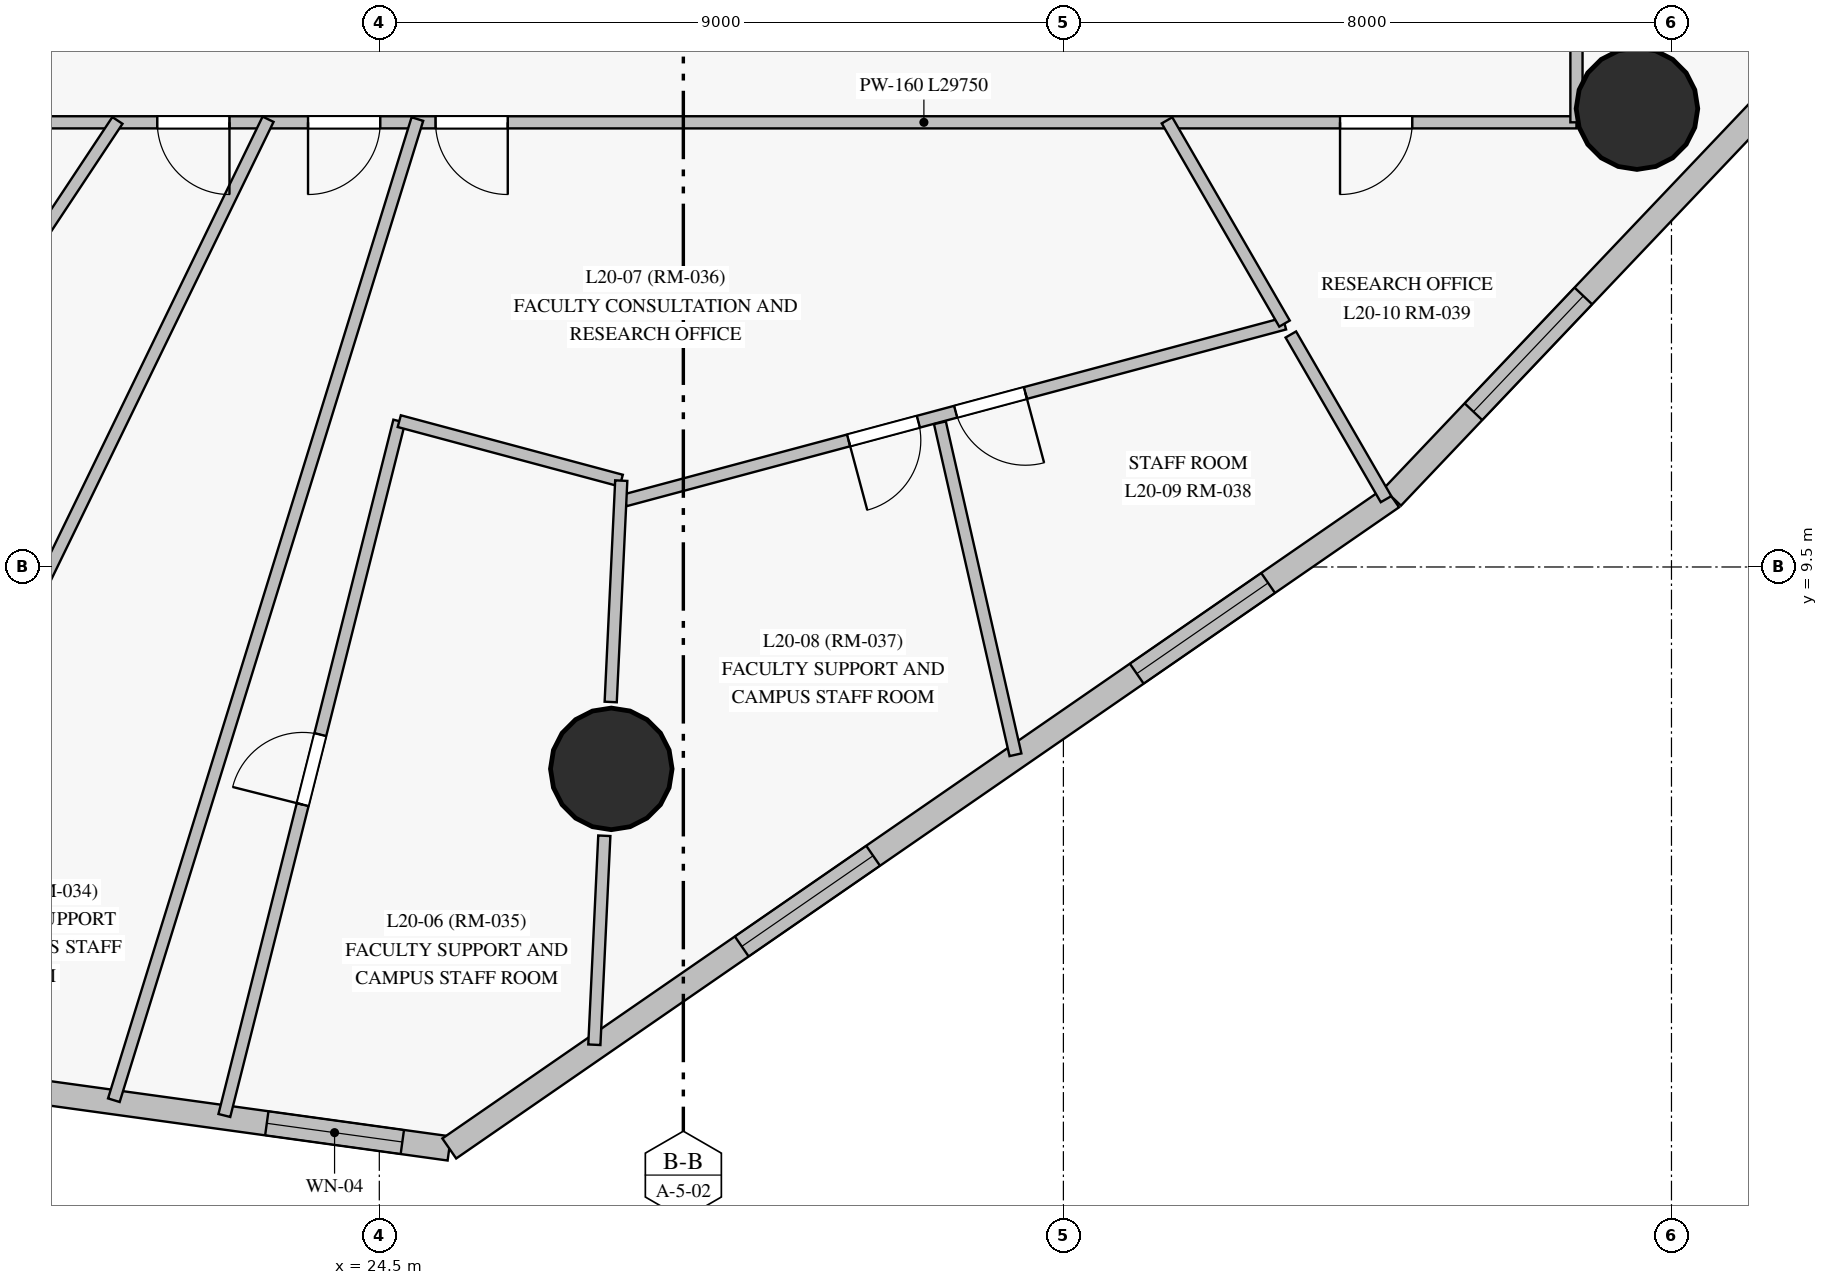
"""IFC4 building model, lengths in metres.
Left out: names, types, materials, properties, quantities, classifications, styles, units other than length and angle.
Written with IfcOpenShell. Run it as: python <this file> out.ifc"""

import sys

from ifc_helpers import new_model, si_unit, direction, frame, frame_2d, origin, origin_with_axes, origin_2d, place, context, subcontext, project, spatial, rectangle, circle, extrude, source, transform, mapped, element, fill, save


model = new_model("IFC4")
c1 = context("Model", 3, precision=1e-05, world=origin(), true_north=direction((0.0, 1.0)))
c2 = subcontext(c1, "Body", "Model", "MODEL_VIEW")
j1 = project(units=[si_unit("LENGTHUNIT", "METRE"), si_unit("PLANEANGLEUNIT", "RADIAN")], contexts=[c1])
p1 = place(None, origin())
s1 = spatial("IfcSite", under=j1, at=p1, CompositionType="ELEMENT")
p2 = place(p1, origin())
s2 = spatial("IfcBuilding", under=s1, at=p2, CompositionType="ELEMENT")
p3 = place(p2, frame((0.0, 0.0, 76.9)))
s3 = spatial("IfcBuildingStorey", under=s2, at=p3, CompositionType="ELEMENT", Elevation=76.9)
m1 = source(origin_with_axes(), c2, "Body", "SweptSolid", [
    extrude(circle(Radius=0.8, at=origin_2d()), origin(), (0.0, 0.0, 1.0), 3.6),
])
for number, where, z_axis, x_axis in (
    (1, (27.552, 6.844, 0.0), (0.0, 0.0, 1.0), (1.0, 0.0, 0.0)),
    (2, (41.046, 15.53, 0.0), (0.0, 0.0, 1.0), (1.0, 0.0, 0.0)),
):
    element("IfcColumn", number, at=place(p3, frame(where, z_axis=z_axis, x_axis=x_axis)), inside=s3, PredefinedType="COLUMN", context=c2, shape_type="MappedRepresentation", body=[
        mapped(m1, transform((0.0, 0.0, 0.0), scale=1.0)),
    ])
p4 = place(p3, frame((15.447, 3.226, 0.0), z_axis=(0.0, 0.0, 1.0), x_axis=(0.990613318008, -0.136694016636, 0.0)))
e3 = element("IfcWall", 3, at=p4, inside=s3, PredefinedType="SOLIDWALL", context=c2, shape_type="SweptSolid", body=[
    extrude(rectangle(XDim=10.068, YDim=0.32, at=frame_2d((5.034, 0.0))), origin(), (0.0, 0.0, 1.0), 3.35),
])
p5 = place(p4, frame((2.563, 0.0, 0.85)))
e4 = element("IfcOpeningElement", 4, at=p5, cuts=e3, PredefinedType="OPENING", context=c2, shape_type="SweptSolid", body=[
    extrude(rectangle(XDim=2.1, YDim=1.95, at=frame_2d((1.05, 0.975))), frame((0.0, 0.17, 0.0), z_axis=(0.0, -1.0, 0.0), x_axis=(1.0, 0.0, 0.0)), (0.0, 0.0, 1.0), 0.34),
])
p6 = place(p4, frame((7.645, 0.0, 0.85)))
e5 = element("IfcOpeningElement", 5, at=p6, cuts=e3, PredefinedType="OPENING", context=c2, shape_type="SweptSolid", body=[
    extrude(rectangle(XDim=1.8, YDim=1.85, at=frame_2d((0.9, 0.925))), frame((0.0, 0.17, 0.0), z_axis=(0.0, -1.0, 0.0), x_axis=(1.0, 0.0, 0.0)), (0.0, 0.0, 1.0), 0.34),
])
p7 = place(p3, frame((25.42, 1.85, 0.0), z_axis=(0.0, 0.0, 1.0), x_axis=(0.822842271762, 0.568269826581, 0.0)))
e6 = element("IfcWall", 6, at=p7, inside=s3, PredefinedType="SOLIDWALL", context=c2, shape_type="SweptSolid", body=[
    extrude(rectangle(XDim=15.076, YDim=0.32, at=frame_2d((7.538, 0.0))), origin(), (0.0, 0.0, 1.0), 3.35),
])
p8 = place(p7, frame((4.677, 0.0, 0.85)))
e7 = element("IfcOpeningElement", 7, at=p8, cuts=e6, PredefinedType="OPENING", context=c2, shape_type="SweptSolid", body=[
    extrude(rectangle(XDim=2.1, YDim=1.95, at=frame_2d((1.05, 0.975))), frame((0.0, 0.17, 0.0), z_axis=(0.0, -1.0, 0.0), x_axis=(1.0, 0.0, 0.0)), (0.0, 0.0, 1.0), 0.34),
])
p9 = place(p7, frame((10.992, 0.0, 0.85)))
e8 = element("IfcOpeningElement", 8, at=p9, cuts=e6, PredefinedType="OPENING", context=c2, shape_type="SweptSolid", body=[
    extrude(rectangle(XDim=2.1, YDim=1.95, at=frame_2d((1.05, 0.975))), frame((0.0, 0.17, 0.0), z_axis=(0.0, -1.0, 0.0), x_axis=(1.0, 0.0, 0.0)), (0.0, 0.0, 1.0), 0.34),
])
p10 = place(p3, frame((37.825, 10.417, 0.0), z_axis=(0.0, 0.0, 1.0), x_axis=(0.688609262867, 0.725132596905, 0.0)))
e9 = element("IfcWall", 9, at=p10, inside=s3, PredefinedType="SOLIDWALL", context=c2, shape_type="SweptSolid", body=[
    extrude(rectangle(XDim=10.481, YDim=0.32, at=frame_2d((5.241, 0.0))), origin(), (0.0, 0.0, 1.0), 3.35),
])
p11 = place(p10, frame((1.552, 0.0, 0.85)))
e10 = element("IfcOpeningElement", 10, at=p11, cuts=e9, PredefinedType="OPENING", context=c2, shape_type="SweptSolid", body=[
    extrude(rectangle(XDim=2.1, YDim=1.95, at=frame_2d((1.05, 0.975))), frame((0.0, 0.17, 0.0), z_axis=(0.0, -1.0, 0.0), x_axis=(1.0, 0.0, 0.0)), (0.0, 0.0, 1.0), 0.34),
])
p12 = place(p10, frame((7.513, 0.0, 0.85)))
e11 = element("IfcOpeningElement", 11, at=p12, cuts=e9, PredefinedType="OPENING", context=c2, shape_type="SweptSolid", body=[
    extrude(rectangle(XDim=2.1, YDim=1.95, at=frame_2d((1.05, 0.975))), frame((0.0, 0.17, 0.0), z_axis=(0.0, -1.0, 0.0), x_axis=(1.0, 0.0, 0.0)), (0.0, 0.0, 1.0), 0.34),
])
p13 = place(p3, frame((40.25, 15.35, 0.0), z_axis=(0.0, 0.0, 1.0), x_axis=(-1.0, 0.0, 0.0)))
e12 = element("IfcWall", 12, at=p13, inside=s3, PredefinedType="PARTITIONING", context=c2, shape_type="SweptSolid", body=[
    extrude(rectangle(XDim=29.75, YDim=0.16, at=frame_2d((14.875, 0.0))), origin(), (0.0, 0.0, 1.0), 2.7),
])
p14 = place(p13, frame((26.037, 0.0, 0.0)))
e13 = element("IfcOpeningElement", 13, at=p14, cuts=e12, PredefinedType="OPENING", context=c2, shape_type="SweptSolid", body=[
    extrude(rectangle(XDim=0.96, YDim=2.15, at=frame_2d((0.48, 1.075))), frame((0.0, 0.09, 0.0), z_axis=(0.0, -1.0, 0.0), x_axis=(1.0, 0.0, 0.0)), (0.0, 0.0, 1.0), 0.18),
])
p15 = place(p13, frame((21.837, 0.0, 0.0)))
e14 = element("IfcOpeningElement", 14, at=p15, cuts=e12, PredefinedType="OPENING", context=c2, shape_type="SweptSolid", body=[
    extrude(rectangle(XDim=0.95, YDim=2.15, at=frame_2d((0.475, 1.075))), frame((0.0, 0.09, 0.0), z_axis=(0.0, -1.0, 0.0), x_axis=(1.0, 0.0, 0.0)), (0.0, 0.0, 1.0), 0.18),
])
p16 = place(p13, frame((17.721, 0.0, 0.0)))
e15 = element("IfcOpeningElement", 15, at=p16, cuts=e12, PredefinedType="OPENING", context=c2, shape_type="SweptSolid", body=[
    extrude(rectangle(XDim=0.95, YDim=2.15, at=frame_2d((0.475, 1.075))), frame((0.0, 0.09, 0.0), z_axis=(0.0, -1.0, 0.0), x_axis=(1.0, 0.0, 0.0)), (0.0, 0.0, 1.0), 0.18),
])
p17 = place(p13, frame((15.738, 0.0, 0.0)))
e16 = element("IfcOpeningElement", 16, at=p17, cuts=e12, PredefinedType="OPENING", context=c2, shape_type="SweptSolid", body=[
    extrude(rectangle(XDim=0.95, YDim=2.15, at=frame_2d((0.475, 1.075))), frame((0.0, 0.09, 0.0), z_axis=(0.0, -1.0, 0.0), x_axis=(1.0, 0.0, 0.0)), (0.0, 0.0, 1.0), 0.18),
])
p18 = place(p13, frame((14.06, 0.0, 0.0)))
e17 = element("IfcOpeningElement", 17, at=p18, cuts=e12, PredefinedType="OPENING", context=c2, shape_type="SweptSolid", body=[
    extrude(rectangle(XDim=0.95, YDim=2.15, at=frame_2d((0.475, 1.075))), frame((0.0, 0.09, 0.0), z_axis=(0.0, -1.0, 0.0), x_axis=(1.0, 0.0, 0.0)), (0.0, 0.0, 1.0), 0.18),
])
p19 = place(p13, frame((2.16, 0.0, 0.0)))
e18 = element("IfcOpeningElement", 18, at=p19, cuts=e12, PredefinedType="OPENING", context=c2, shape_type="SweptSolid", body=[
    extrude(rectangle(XDim=0.95, YDim=2.15, at=frame_2d((0.475, 1.075))), frame((0.0, 0.09, 0.0), z_axis=(0.0, -1.0, 0.0), x_axis=(1.0, 0.0, 0.0)), (0.0, 0.0, 1.0), 0.18),
])
p20 = place(p3, frame((40.25, 37.65, 0.0), z_axis=(0.0, 0.0, 1.0), x_axis=(0.0, -1.0, 0.0)))
e19 = element("IfcWall", 19, at=p20, inside=s3, PredefinedType="PARTITIONING", context=c2, shape_type="SweptSolid", body=[
    extrude(rectangle(XDim=22.3, YDim=0.16, at=frame_2d((11.15, 0.0))), origin(), (0.0, 0.0, 1.0), 2.75),
])
p21 = place(p20, frame((14.02, 0.0, 0.0)))
e20 = element("IfcOpeningElement", 20, at=p21, cuts=e19, PredefinedType="OPENING", context=c2, shape_type="SweptSolid", body=[
    extrude(rectangle(XDim=0.95, YDim=2.15, at=frame_2d((0.475, 1.075))), frame((0.0, 0.09, 0.0), z_axis=(0.0, -1.0, 0.0), x_axis=(1.0, 0.0, 0.0)), (0.0, 0.0, 1.0), 0.18),
])
p22 = place(p20, frame((10.675, 0.0, 0.0)))
e21 = element("IfcOpeningElement", 21, at=p22, cuts=e19, PredefinedType="OPENING", context=c2, shape_type="SweptSolid", body=[
    extrude(rectangle(XDim=0.95, YDim=2.15, at=frame_2d((0.475, 1.075))), frame((0.0, 0.09, 0.0), z_axis=(0.0, -1.0, 0.0), x_axis=(1.0, 0.0, 0.0)), (0.0, 0.0, 1.0), 0.18),
])
p23 = place(p20, frame((8.167, 0.0, 0.0)))
e22 = element("IfcOpeningElement", 22, at=p23, cuts=e19, PredefinedType="OPENING", context=c2, shape_type="SweptSolid", body=[
    extrude(rectangle(XDim=0.86, YDim=2.1, at=frame_2d((0.43, 1.05))), frame((0.0, 0.09, 0.0), z_axis=(0.0, -1.0, 0.0), x_axis=(1.0, 0.0, 0.0)), (0.0, 0.0, 1.0), 0.18),
])
p24 = place(p20, frame((5.49, 0.0, 0.0)))
e23 = element("IfcOpeningElement", 23, at=p24, cuts=e19, PredefinedType="OPENING", context=c2, shape_type="SweptSolid", body=[
    extrude(rectangle(XDim=0.95, YDim=2.15, at=frame_2d((0.475, 1.075))), frame((0.0, 0.09, 0.0), z_axis=(0.0, -1.0, 0.0), x_axis=(1.0, 0.0, 0.0)), (0.0, 0.0, 1.0), 0.18),
])
p25 = place(p20, frame((2.932, 0.0, 0.0)))
e24 = element("IfcOpeningElement", 24, at=p25, cuts=e19, PredefinedType="OPENING", context=c2, shape_type="SweptSolid", body=[
    extrude(rectangle(XDim=0.95, YDim=2.15, at=frame_2d((0.475, 1.075))), frame((0.0, 0.09, 0.0), z_axis=(0.0, -1.0, 0.0), x_axis=(1.0, 0.0, 0.0)), (0.0, 0.0, 1.0), 0.18),
])
p26 = place(p20, frame((6.622, 0.0, 0.0)))
e25 = element("IfcOpeningElement", 25, at=p26, cuts=e19, PredefinedType="OPENING", context=c2, shape_type="SweptSolid", body=[
    extrude(rectangle(XDim=0.95, YDim=2.15, at=frame_2d((0.475, 1.075))), frame((0.0, 0.09, 0.0), z_axis=(0.0, -1.0, 0.0), x_axis=(1.0, 0.0, 0.0)), (0.0, 0.0, 1.0), 0.18),
])
p27 = place(p3, frame((23.037, 15.39, 0.0), z_axis=(0.0, 0.0, 1.0), x_axis=(-0.436938889673, -0.899491193226, 0.0)))
e26 = element("IfcWall", 26, at=p27, inside=s3, PredefinedType="PARTITIONING", context=c2, shape_type="SweptSolid", body=[
    extrude(rectangle(XDim=13.735, YDim=0.16, at=frame_2d((6.868, 0.0))), origin(), (0.0, 0.0, 1.0), 3.35),
])
p28 = place(p3, frame((25.001, 15.393, 0.0), z_axis=(0.0, 0.0, 1.0), x_axis=(-0.29553806887, -0.955330963514, 0.0)))
e27 = element("IfcWall", 27, at=p28, inside=s3, PredefinedType="PARTITIONING", context=c2, shape_type="SweptSolid", body=[
    extrude(rectangle(XDim=13.511, YDim=0.16, at=frame_2d((6.756, 0.0))), origin(), (0.0, 0.0, 1.0), 3.35),
])
p29 = place(p3, frame((22.461, 2.284, 0.0), z_axis=(0.0, 0.0, 1.0), x_axis=(0.244291469889, 0.969701849921, 0.0)))
e28 = element("IfcWall", 28, at=p29, inside=s3, PredefinedType="PARTITIONING", context=c2, shape_type="SweptSolid", body=[
    extrude(rectangle(XDim=9.42, YDim=0.16, at=frame_2d((4.71, 0.0))), origin(), (0.0, 0.0, 1.0), 3.35),
])
p30 = place(p29, frame((4.218, 0.0, 0.0)))
e29 = element("IfcOpeningElement", 29, at=p30, cuts=e28, PredefinedType="OPENING", context=c2, shape_type="SweptSolid", body=[
    extrude(rectangle(XDim=0.95, YDim=2.15, at=frame_2d((0.475, 1.075))), frame((0.0, 0.09, 0.0), z_axis=(0.0, -1.0, 0.0), x_axis=(1.0, 0.0, 0.0)), (0.0, 0.0, 1.0), 0.18),
])
p31 = place(p3, frame((21.055, 15.375, 0.0), z_axis=(0.0, 0.0, 1.0), x_axis=(-0.552453765645, -0.833543542248, 0.0)))
e30 = element("IfcWall", 30, at=p31, inside=s3, PredefinedType="PARTITIONING", context=c2, shape_type="SweptSolid", body=[
    extrude(rectangle(XDim=8.409, YDim=0.16, at=frame_2d((4.205, 0.0))), origin(), (0.0, 0.0, 1.0), 3.35),
])
p32 = place(p3, frame((36.409, 12.702, 0.0), z_axis=(0.0, 0.0, 1.0), x_axis=(-0.965923911336, -0.258826191699, 0.0)))
e31 = element("IfcWall", 31, at=p32, inside=s3, PredefinedType="PARTITIONING", context=c2, shape_type="SweptSolid", body=[
    extrude(rectangle(XDim=8.984, YDim=0.16, at=frame_2d((4.492, 0.0))), origin(), (0.0, 0.0, 1.0), 2.75),
])
p33 = place(p32, frame((4.987, 0.0, 0.0)))
e32 = element("IfcOpeningElement", 32, at=p33, cuts=e31, PredefinedType="OPENING", context=c2, shape_type="SweptSolid", body=[
    extrude(rectangle(XDim=0.95, YDim=2.15, at=frame_2d((0.475, 1.075))), frame((0.0, 0.09, 0.0), z_axis=(0.0, -1.0, 0.0), x_axis=(1.0, 0.0, 0.0)), (0.0, 0.0, 1.0), 0.18),
])
p34 = place(p32, frame((3.529, 0.0, 0.0)))
e33 = element("IfcOpeningElement", 33, at=p34, cuts=e31, PredefinedType="OPENING", context=c2, shape_type="SweptSolid", body=[
    extrude(rectangle(XDim=0.95, YDim=2.15, at=frame_2d((0.475, 1.075))), frame((0.0, 0.09, 0.0), z_axis=(0.0, -1.0, 0.0), x_axis=(1.0, 0.0, 0.0)), (0.0, 0.0, 1.0), 0.18),
])
p35 = place(p3, frame((31.875, 11.397, 0.0), z_axis=(0.0, 0.0, 1.0), x_axis=(0.221884940949, -0.975072855216, 0.0)))
e34 = element("IfcWall", 34, at=p35, inside=s3, PredefinedType="PARTITIONING", context=c2, shape_type="SweptSolid", body=[
    extrude(rectangle(XDim=4.479, YDim=0.16, at=frame_2d((2.24, 0.0))), origin(), (0.0, 0.0, 1.0), 3.35),
])
p36 = place(p3, frame((34.863, 15.376, 0.0), z_axis=(0.0, 0.0, 1.0), x_axis=(0.500584406254, -0.865687733664, 0.0)))
e35 = element("IfcWall", 35, at=p36, inside=s3, PredefinedType="PARTITIONING", context=c2, shape_type="SweptSolid", body=[
    extrude(rectangle(XDim=3.089, YDim=0.16, at=frame_2d((1.544, 0.0))), origin(), (0.0, 0.0, 1.0), 3.35),
])
p37 = place(p3, frame((24.763, 11.419, 0.0), z_axis=(0.0, 0.0, 1.0), x_axis=(0.965909841148, -0.258878695094, 0.0)))
e36 = element("IfcWall", 36, at=p37, inside=s3, PredefinedType="PARTITIONING", context=c2, shape_type="SweptSolid", body=[
    extrude(rectangle(XDim=3.023, YDim=0.16, at=frame_2d((1.512, 0.0))), origin(), (0.0, 0.0, 1.0), 2.75),
])
p38 = place(p3, frame((27.683, 10.636, 0.0), z_axis=(0.0, 0.0, 1.0), x_axis=(-0.047652686873, -0.99886396543, 0.0)))
e37 = element("IfcWall", 37, at=p38, inside=s3, PredefinedType="PARTITIONING", context=c2, shape_type="SweptSolid", body=[
    extrude(rectangle(XDim=2.915, YDim=0.16, at=frame_2d((1.458, 0.0))), origin(), (0.0, 0.0, 1.0), 2.7),
])
p39 = place(p3, frame((27.46, 5.964, 0.0), z_axis=(0.0, 0.0, 1.0), x_axis=(-0.047628358421, -0.998865125767, 0.0)))
e38 = element("IfcWall", 38, at=p39, inside=s3, PredefinedType="PARTITIONING", context=c2, shape_type="SweptSolid", body=[
    extrude(rectangle(XDim=2.753, YDim=0.16, at=frame_2d((1.376, 0.0))), origin(), (0.0, 0.0, 1.0), 3.35),
])
p40 = place(p3, frame((36.492, 12.559, 0.0), z_axis=(0.0, 0.0, 1.0), x_axis=(0.500555501358, -0.865704447291, 0.0)))
e39 = element("IfcWall", 39, at=p40, inside=s3, PredefinedType="PARTITIONING", context=c2, shape_type="SweptSolid", body=[
    extrude(rectangle(XDim=2.503, YDim=0.16, at=frame_2d((1.251, 0.0))), origin(), (0.0, 0.0, 1.0), 3.35),
])
m2 = source(origin_with_axes(), c2, "Body", "SweptSolid", [
    extrude(rectangle(XDim=1.8, YDim=1.85, at=frame_2d((0.9, 0.925))), frame((0.0, 0.03, 0.0), z_axis=(0.0, -1.0, 0.0), x_axis=(1.0, 0.0, 0.0)), (0.0, 0.0, 1.0), 0.06),
])
p41 = place(p6, origin())
e40 = element("IfcWindow", 40, at=p41, inside=s3, PartitioningType="SINGLE_PANEL", PredefinedType="WINDOW", context=c2, shape_type="MappedRepresentation", body=[
    mapped(m2, transform((0.0, 0.0, 0.0), scale=1.0)),
])
fill(e5, e40)
m3 = source(origin_with_axes(), c2, "Body", "SweptSolid", [
    extrude(rectangle(XDim=2.1, YDim=1.95, at=frame_2d((1.05, 0.975))), frame((0.0, 0.03, 0.0), z_axis=(0.0, -1.0, 0.0), x_axis=(1.0, 0.0, 0.0)), (0.0, 0.0, 1.0), 0.06),
])
p42 = place(p8, origin())
e41 = element("IfcWindow", 41, at=p42, inside=s3, PartitioningType="SINGLE_PANEL", PredefinedType="WINDOW", context=c2, shape_type="MappedRepresentation", body=[
    mapped(m3, transform((0.0, 0.0, 0.0), scale=1.0)),
])
fill(e7, e41)
p43 = place(p9, origin())
e42 = element("IfcWindow", 42, at=p43, inside=s3, PartitioningType="SINGLE_PANEL", PredefinedType="WINDOW", context=c2, shape_type="MappedRepresentation", body=[
    mapped(m3, transform((0.0, 0.0, 0.0), scale=1.0)),
])
fill(e8, e42)
p44 = place(p11, origin())
e43 = element("IfcWindow", 43, at=p44, inside=s3, PartitioningType="SINGLE_PANEL", PredefinedType="WINDOW", context=c2, shape_type="MappedRepresentation", body=[
    mapped(m3, transform((0.0, 0.0, 0.0), scale=1.0)),
])
fill(e10, e43)
m4 = source(origin_with_axes(), c2, "Body", "SweptSolid", [
    extrude(rectangle(XDim=0.95, YDim=2.15, at=frame_2d((0.475, 1.075))), frame((0.0, 0.025, 0.0), z_axis=(0.0, -1.0, 0.0), x_axis=(1.0, 0.0, 0.0)), (0.0, 0.0, 1.0), 0.05),
])
p45 = place(p16, origin())
e44 = element("IfcDoor", 44, at=p45, inside=s3, OperationType="SINGLE_SWING_LEFT", PredefinedType="DOOR", context=c2, shape_type="MappedRepresentation", body=[
    mapped(m4, transform((0.0, 0.0, 0.0), scale=1.0)),
])
fill(e15, e44)
p46 = place(p17, origin())
e45 = element("IfcDoor", 45, at=p46, inside=s3, OperationType="SINGLE_SWING_RIGHT", PredefinedType="DOOR", context=c2, shape_type="MappedRepresentation", body=[
    mapped(m4, transform((0.0, 0.0, 0.0), scale=1.0)),
])
fill(e16, e45)
p47 = place(p18, origin())
e46 = element("IfcDoor", 46, at=p47, inside=s3, OperationType="SINGLE_SWING_LEFT", PredefinedType="DOOR", context=c2, shape_type="MappedRepresentation", body=[
    mapped(m4, transform((0.0, 0.0, 0.0), scale=1.0)),
])
fill(e17, e46)
p48 = place(p19, origin())
e47 = element("IfcDoor", 47, at=p48, inside=s3, OperationType="SINGLE_SWING_RIGHT", PredefinedType="DOOR", context=c2, shape_type="MappedRepresentation", body=[
    mapped(m4, transform((0.0, 0.0, 0.0), scale=1.0)),
])
fill(e18, e47)
p49 = place(p30, origin())
e48 = element("IfcDoor", 48, at=p49, inside=s3, OperationType="SINGLE_SWING_LEFT", PredefinedType="DOOR", context=c2, shape_type="MappedRepresentation", body=[
    mapped(m4, transform((0.0, 0.0, 0.0), scale=1.0)),
])
fill(e29, e48)
p50 = place(p33, origin())
e49 = element("IfcDoor", 49, at=p50, inside=s3, OperationType="SINGLE_SWING_RIGHT", PredefinedType="DOOR", context=c2, shape_type="MappedRepresentation", body=[
    mapped(m4, transform((0.0, 0.0, 0.0), scale=1.0)),
])
fill(e32, e49)
p51 = place(p34, origin())
e50 = element("IfcDoor", 50, at=p51, inside=s3, OperationType="SINGLE_SWING_LEFT", PredefinedType="DOOR", context=c2, shape_type="MappedRepresentation", body=[
    mapped(m4, transform((0.0, 0.0, 0.0), scale=1.0)),
])
fill(e33, e50)
save(model, sys.argv[1])
